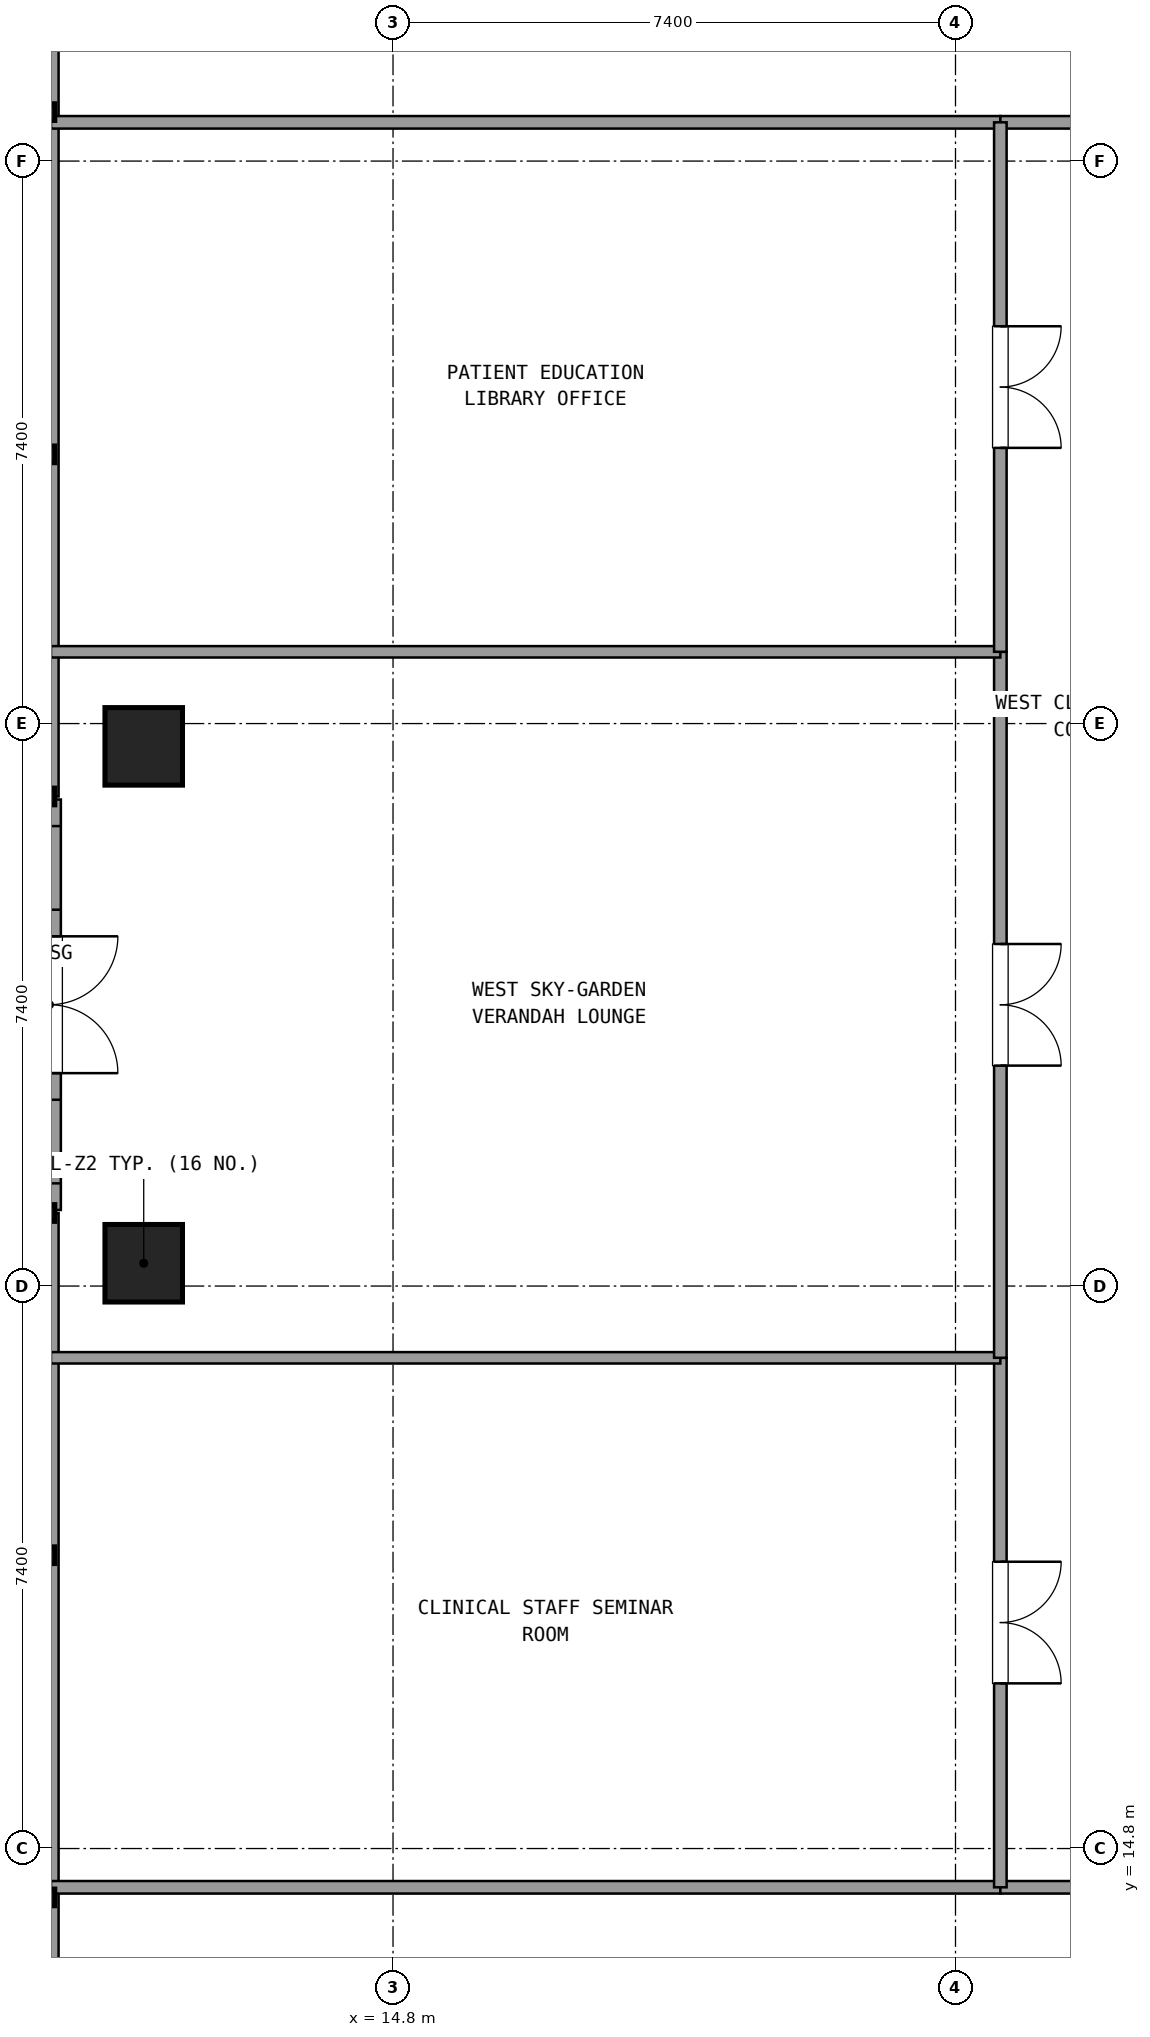
"""IFC4 building model, lengths in metres.
Left out: names, types, materials, properties, quantities, classifications, styles, units other than length and angle.
Written with IfcOpenShell. Run it as: python <this file> out.ifc"""

import sys

from ifc_helpers import new_model, si_unit, direction, frame, frame_2d, origin, origin_2d, place, context, subcontext, project, spatial, rectangle, extrude, element, fill, save


model = new_model("IFC4")
c1 = context("Model", 3, precision=1e-05, world=origin(), true_north=direction((0.0, 1.0)))
c2 = subcontext(c1, "Body", "Model", "MODEL_VIEW")
j1 = project(units=[si_unit("LENGTHUNIT", "METRE"), si_unit("PLANEANGLEUNIT", "RADIAN")], contexts=[c1])
p1 = place(None, origin())
s1 = spatial("IfcSite", under=j1, at=p1, CompositionType="ELEMENT")
p2 = place(p1, origin())
s2 = spatial("IfcBuilding", under=s1, at=p2, CompositionType="ELEMENT")
p3 = place(p2, frame((0.0, 0.0, 75.42)))
s3 = spatial("IfcBuildingStorey", under=s2, at=p3, CompositionType="ELEMENT", Elevation=75.42)
for number, where, z_axis, x_axis in (
    (1, (11.52, 22.5, 0.0), (0.0, 0.0, 1.0), (1.0, 0.0, 0.0)),
    (2, (11.52, 29.3, 0.0), (0.0, 0.0, 1.0), (1.0, 0.0, 0.0)),
):
    element("IfcColumn", number, at=place(p3, frame(where, z_axis=z_axis, x_axis=x_axis)), inside=s3, PredefinedType="COLUMN", context=c2, shape_type="SweptSolid", body=[
        extrude(rectangle(XDim=1.02, YDim=1.02, at=origin_2d()), origin(), (0.0, 0.0, 1.0), 5.76),
    ])
p4 = place(p3, frame((10.28, 28.601, 0.0), z_axis=(0.0, 0.0, 1.0), x_axis=(0.0, -1.0, 0.0)))
e3 = element("IfcWall", 3, at=p4, inside=s3, PredefinedType="SOLIDWALL", context=c2, shape_type="SweptSolid", body=[
    extrude(rectangle(XDim=5.4, YDim=0.3, at=frame_2d((2.7, 0.0))), origin(), (0.0, 0.0, 1.0), 4.83),
])
p5 = place(p4, frame((1.8, 0.0, 0.0)))
e4 = element("IfcOpeningElement", 4, at=p5, cuts=e3, PredefinedType="OPENING", context=c2, shape_type="SweptSolid", body=[
    extrude(rectangle(XDim=1.8, YDim=2.25, at=frame_2d((0.9, 1.125))), frame((0.0, 0.16, 0.0), z_axis=(0.0, -1.0, 0.0), x_axis=(1.0, 0.0, 0.0)), (0.0, 0.0, 1.0), 0.32),
])
p6 = place(p4, frame((0.35, 0.0, 0.4)))
e5 = element("IfcOpeningElement", 5, at=p6, cuts=e3, PredefinedType="OPENING", context=c2, shape_type="SweptSolid", body=[
    extrude(rectangle(XDim=1.1, YDim=1.8, at=frame_2d((0.55, 0.9))), frame((0.0, 0.16, 0.0), z_axis=(0.0, -1.0, 0.0), x_axis=(1.0, 0.0, 0.0)), (0.0, 0.0, 1.0), 0.32),
])
p7 = place(p4, frame((3.95, 0.0, 0.4)))
e6 = element("IfcOpeningElement", 6, at=p7, cuts=e3, PredefinedType="OPENING", context=c2, shape_type="SweptSolid", body=[
    extrude(rectangle(XDim=1.1, YDim=1.8, at=frame_2d((0.55, 0.9))), frame((0.0, 0.16, 0.0), z_axis=(0.0, -1.0, 0.0), x_axis=(1.0, 0.0, 0.0)), (0.0, 0.0, 1.0), 0.32),
])
p8 = place(p3, frame((10.28, 42.145, 0.0), z_axis=(0.0, 0.0, 1.0), x_axis=(0.0, -1.0, 0.0)))
e7 = element("IfcWall", 7, at=p8, inside=s3, PredefinedType="SOLIDWALL", context=c2, shape_type="SweptSolid", body=[
    extrude(rectangle(XDim=13.504, YDim=0.24, at=frame_2d((6.752, 0.0))), origin(), (0.0, 0.0, 1.0), 0.85),
])
p9 = place(p3, frame((10.28, 23.161, 0.0), z_axis=(0.0, 0.0, 1.0), x_axis=(0.0, -1.0, 0.0)))
e8 = element("IfcWall", 8, at=p9, inside=s3, PredefinedType="SOLIDWALL", context=c2, shape_type="SweptSolid", body=[
    extrude(rectangle(XDim=13.506, YDim=0.24, at=frame_2d((6.753, 0.0))), origin(), (0.0, 0.0, 1.0), 0.85),
])
for number, where, z_axis, x_axis in (
    (9, (10.3, 37.51, 0.0), (0.0, 0.0, 1.0), (1.0, 0.0, 0.0)),
    (10, (10.3, 14.29, 0.0), (0.0, 0.0, 1.0), (1.0, 0.0, 0.0)),
):
    element("IfcWall", number, at=place(p3, frame(where, z_axis=z_axis, x_axis=x_axis)), inside=s3, PredefinedType="PARTITIONING", context=c2, shape_type="SweptSolid", body=[
        extrude(rectangle(XDim=12.49, YDim=0.165, at=frame_2d((6.245, 0.0))), origin(), (0.0, 0.0, 1.0), 4.77),
    ])
p10 = place(p3, frame((22.79, 37.51, 0.0), z_axis=(0.0, 0.0, 1.0), x_axis=(1.0, 0.0, 0.0)))
e11 = element("IfcWall", 11, at=p10, inside=s3, PredefinedType="PARTITIONING", context=c2, shape_type="SweptSolid", body=[
    extrude(rectangle(XDim=4.452, YDim=0.165, at=frame_2d((2.226, 0.0))), origin(), (0.0, 0.0, 1.0), 4.77),
])
p11 = place(p10, frame((1.426, 0.0, 0.0)))
e12 = element("IfcOpeningElement", 12, at=p11, cuts=e11, PredefinedType="OPENING", context=c2, shape_type="SweptSolid", body=[
    extrude(rectangle(XDim=1.6, YDim=2.2, at=frame_2d((0.8, 1.1))), frame((0.0, 0.093, 0.0), z_axis=(0.0, -1.0, 0.0), x_axis=(1.0, 0.0, 0.0)), (0.0, 0.0, 1.0), 0.185),
])
p12 = place(p3, frame((22.79, 14.29, 0.0), z_axis=(0.0, 0.0, 1.0), x_axis=(1.0, 0.0, 0.0)))
e13 = element("IfcWall", 13, at=p12, inside=s3, PredefinedType="PARTITIONING", context=c2, shape_type="SweptSolid", body=[
    extrude(rectangle(XDim=5.992, YDim=0.165, at=frame_2d((2.996, 0.0))), origin(), (0.0, 0.0, 1.0), 4.77),
])
p13 = place(p12, frame((2.196, 0.0, 0.0)))
e14 = element("IfcOpeningElement", 14, at=p13, cuts=e13, PredefinedType="OPENING", context=c2, shape_type="SweptSolid", body=[
    extrude(rectangle(XDim=1.6, YDim=2.2, at=frame_2d((0.8, 1.1))), frame((0.0, 0.093, 0.0), z_axis=(0.0, -1.0, 0.0), x_axis=(1.0, 0.0, 0.0)), (0.0, 0.0, 1.0), 0.185),
])
p14 = place(p3, frame((22.79, 14.29, 0.0), z_axis=(0.0, 0.0, 1.0), x_axis=(0.0, 1.0, 0.0)))
e15 = element("IfcWall", 15, at=p14, inside=s3, PredefinedType="PARTITIONING", context=c2, shape_type="SweptSolid", body=[
    extrude(rectangle(XDim=6.966, YDim=0.165, at=frame_2d((3.483, 0.0))), origin(), (0.0, 0.0, 1.0), 4.77),
])
p15 = place(p14, frame((2.683, 0.0, 0.0)))
e16 = element("IfcOpeningElement", 16, at=p15, cuts=e15, PredefinedType="OPENING", context=c2, shape_type="SweptSolid", body=[
    extrude(rectangle(XDim=1.6, YDim=2.2, at=frame_2d((0.8, 1.1))), frame((0.0, 0.093, 0.0), z_axis=(0.0, -1.0, 0.0), x_axis=(1.0, 0.0, 0.0)), (0.0, 0.0, 1.0), 0.185),
])
p16 = place(p3, frame((22.79, 21.256, 0.0), z_axis=(0.0, 0.0, 1.0), x_axis=(-1.0, 0.0, 0.0)))
e17 = element("IfcWall", 17, at=p16, inside=s3, PredefinedType="PARTITIONING", context=c2, shape_type="SweptSolid", body=[
    extrude(rectangle(XDim=12.49, YDim=0.15, at=frame_2d((6.245, 0.0))), origin(), (0.0, 0.0, 1.0), 4.77),
])
p17 = place(p3, frame((22.79, 21.256, 0.0), z_axis=(0.0, 0.0, 1.0), x_axis=(0.0, 1.0, 0.0)))
e18 = element("IfcWall", 18, at=p17, inside=s3, PredefinedType="PARTITIONING", context=c2, shape_type="SweptSolid", body=[
    extrude(rectangle(XDim=9.288, YDim=0.165, at=frame_2d((4.644, 0.0))), origin(), (0.0, 0.0, 1.0), 4.77),
])
p18 = place(p17, frame((3.844, 0.0, 0.0)))
e19 = element("IfcOpeningElement", 19, at=p18, cuts=e18, PredefinedType="OPENING", context=c2, shape_type="SweptSolid", body=[
    extrude(rectangle(XDim=1.6, YDim=2.2, at=frame_2d((0.8, 1.1))), frame((0.0, 0.093, 0.0), z_axis=(0.0, -1.0, 0.0), x_axis=(1.0, 0.0, 0.0)), (0.0, 0.0, 1.0), 0.185),
])
p19 = place(p3, frame((22.79, 30.544, 0.0), z_axis=(0.0, 0.0, 1.0), x_axis=(-1.0, 0.0, 0.0)))
e20 = element("IfcWall", 20, at=p19, inside=s3, PredefinedType="PARTITIONING", context=c2, shape_type="SweptSolid", body=[
    extrude(rectangle(XDim=12.49, YDim=0.15, at=frame_2d((6.245, 0.0))), origin(), (0.0, 0.0, 1.0), 4.77),
])
p20 = place(p3, frame((22.79, 30.544, 0.0), z_axis=(0.0, 0.0, 1.0), x_axis=(0.0, 1.0, 0.0)))
e21 = element("IfcWall", 21, at=p20, inside=s3, PredefinedType="PARTITIONING", context=c2, shape_type="SweptSolid", body=[
    extrude(rectangle(XDim=6.966, YDim=0.165, at=frame_2d((3.483, 0.0))), origin(), (0.0, 0.0, 1.0), 4.77),
])
p21 = place(p20, frame((2.683, 0.0, 0.0)))
e22 = element("IfcOpeningElement", 22, at=p21, cuts=e21, PredefinedType="OPENING", context=c2, shape_type="SweptSolid", body=[
    extrude(rectangle(XDim=1.6, YDim=2.2, at=frame_2d((0.8, 1.1))), frame((0.0, 0.093, 0.0), z_axis=(0.0, -1.0, 0.0), x_axis=(1.0, 0.0, 0.0)), (0.0, 0.0, 1.0), 0.185),
])
p22 = place(p15, frame((1.6, 0.0, 0.0), z_axis=(0.0, 0.0, 1.0), x_axis=(-1.0, 0.0, 0.0)))
e23 = element("IfcDoor", 23, at=p22, inside=s3, OperationType="DOUBLE_DOOR_SINGLE_SWING", PredefinedType="DOOR", context=c2, shape_type="SweptSolid", body=[
    extrude(rectangle(XDim=1.6, YDim=2.2, at=frame_2d((0.8, 1.1))), frame((0.0, 0.025, 0.0), z_axis=(0.0, -1.0, 0.0), x_axis=(1.0, 0.0, 0.0)), (0.0, 0.0, 1.0), 0.05),
])
fill(e16, e23)
p23 = place(p18, frame((1.6, 0.0, 0.0), z_axis=(0.0, 0.0, 1.0), x_axis=(-1.0, 0.0, 0.0)))
e24 = element("IfcDoor", 24, at=p23, inside=s3, OperationType="DOUBLE_DOOR_SINGLE_SWING", PredefinedType="DOOR", context=c2, shape_type="SweptSolid", body=[
    extrude(rectangle(XDim=1.6, YDim=2.2, at=frame_2d((0.8, 1.1))), frame((0.0, 0.025, 0.0), z_axis=(0.0, -1.0, 0.0), x_axis=(1.0, 0.0, 0.0)), (0.0, 0.0, 1.0), 0.05),
])
fill(e19, e24)
p24 = place(p21, frame((1.6, 0.0, 0.0), z_axis=(0.0, 0.0, 1.0), x_axis=(-1.0, 0.0, 0.0)))
e25 = element("IfcDoor", 25, at=p24, inside=s3, OperationType="DOUBLE_DOOR_SINGLE_SWING", PredefinedType="DOOR", context=c2, shape_type="SweptSolid", body=[
    extrude(rectangle(XDim=1.6, YDim=2.2, at=frame_2d((0.8, 1.1))), frame((0.0, 0.025, 0.0), z_axis=(0.0, -1.0, 0.0), x_axis=(1.0, 0.0, 0.0)), (0.0, 0.0, 1.0), 0.05),
])
fill(e22, e25)
save(model, sys.argv[1])
